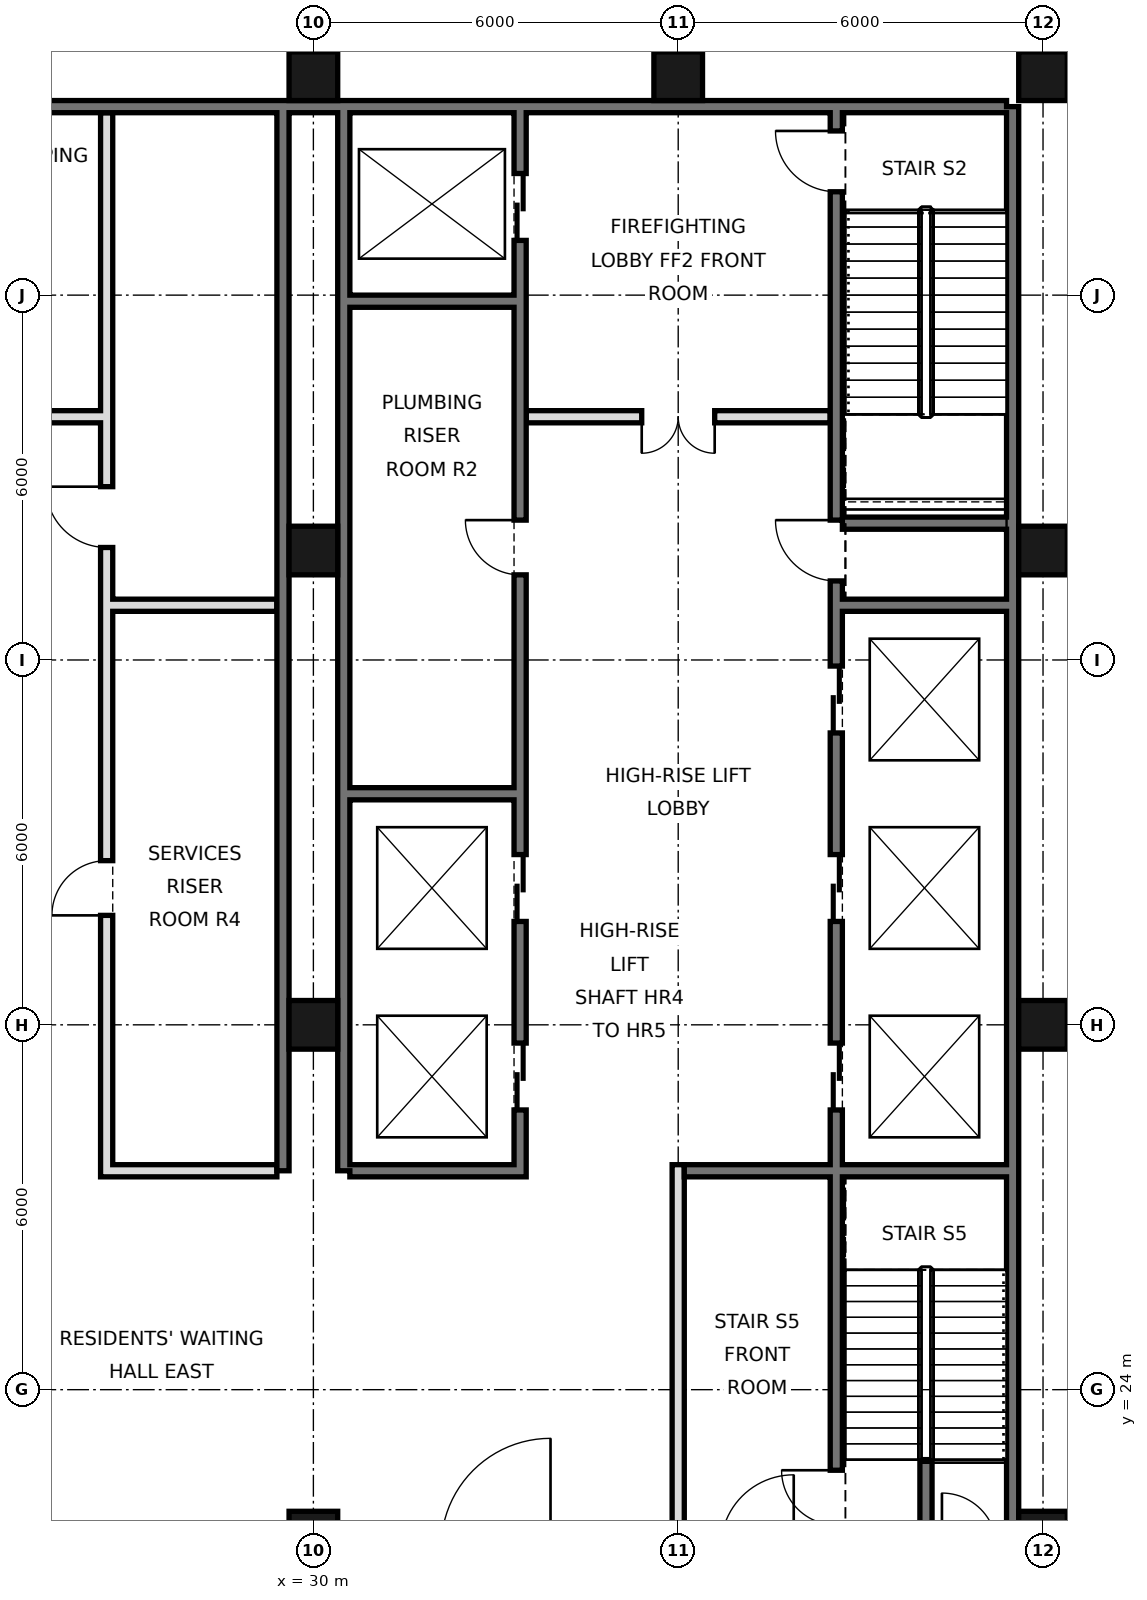
"""IFC4 building model, lengths in metres.
Left out: names, types, materials, properties, quantities, classifications, styles, units other than length and angle.
Written with IfcOpenShell. Run it as: python <this file> out.ifc"""

import sys

from ifc_helpers import new_model, si_unit, direction, frame, frame_2d, origin, origin_2d, place, context, subcontext, project, spatial, rectangle, hollow_rectangle, extrude, element, fill, save


model = new_model("IFC4")
c1 = context("Model", 3, precision=1e-05, world=origin(), true_north=direction((0.0, 1.0)))
c2 = subcontext(c1, "Body", "Model", "MODEL_VIEW")
j1 = project(units=[si_unit("LENGTHUNIT", "METRE"), si_unit("PLANEANGLEUNIT", "RADIAN")], contexts=[c1])
p1 = place(None, origin())
s1 = spatial("IfcSite", under=j1, at=p1, CompositionType="ELEMENT")
p2 = place(p1, origin())
s2 = spatial("IfcBuilding", under=s1, at=p2, CompositionType="ELEMENT")
p3 = place(p2, frame((0.0, 0.0, 281.8)))
s3 = spatial("IfcBuildingStorey", under=s2, at=p3, CompositionType="ELEMENT", Elevation=281.8)
for number, where, z_axis, x_axis in (
    (1, (30.0, 21.6, 0.0), (0.0, 0.0, 1.0), (1.0, 0.0, 0.0)),
    (2, (30.0, 30.0, 0.0), (0.0, 0.0, 1.0), (1.0, 0.0, 0.0)),
    (3, (30.0, 37.8, 0.0), (0.0, 0.0, 1.0), (1.0, 0.0, 0.0)),
    (4, (30.0, 45.6, 0.0), (0.0, 0.0, 1.0), (1.0, 0.0, 0.0)),
    (5, (36.0, 45.6, 0.0), (0.0, 0.0, 1.0), (1.0, 0.0, 0.0)),
    (6, (42.0, 21.6, 0.0), (0.0, 0.0, 1.0), (1.0, 0.0, 0.0)),
    (7, (42.0, 30.0, 0.0), (0.0, 0.0, 1.0), (1.0, 0.0, 0.0)),
    (8, (42.0, 37.8, 0.0), (0.0, 0.0, 1.0), (1.0, 0.0, 0.0)),
    (9, (42.0, 45.6, 0.0), (0.0, 0.0, 1.0), (1.0, 0.0, 0.0)),
):
    element("IfcColumn", number, at=place(p3, frame(where, z_axis=z_axis, x_axis=x_axis)), inside=s3, PredefinedType="COLUMN", context=c2, shape_type="SweptSolid", body=[
        extrude(hollow_rectangle(XDim=0.8, YDim=0.8, WallThickness=0.032, at=origin_2d()), origin(), (0.0, 0.0, 1.0), 9.0),
    ])
p4 = place(p3, frame((41.5, 21.6, 0.0), z_axis=(0.0, 0.0, 1.0), x_axis=(0.0, 1.0, 0.0)))
e10 = element("IfcWall", 10, at=p4, inside=s3, PredefinedType="SOLIDWALL", context=c2, shape_type="SweptSolid", body=[
    extrude(rectangle(XDim=23.5, YDim=0.2, at=frame_2d((11.75, 0.0))), origin(), (0.0, 0.0, 1.0), 8.7),
])
p5 = place(p3, frame((6.6, 45.1, 0.0), z_axis=(0.0, 0.0, 1.0), x_axis=(1.0, 0.0, 0.0)))
e11 = element("IfcWall", 11, at=p5, inside=s3, PredefinedType="SOLIDWALL", context=c2, shape_type="SweptSolid", body=[
    extrude(rectangle(XDim=34.8, YDim=0.2, at=frame_2d((17.4, 0.0))), origin(), (0.0, 0.0, 1.0), 8.7),
])
for number, where, z_axis, x_axis in (
    (12, (29.5, 27.6, 0.0), (0.0, 0.0, 1.0), (0.0, 1.0, 0.0)),
    (13, (30.5, 27.6, 0.0), (0.0, 0.0, 1.0), (0.0, 1.0, 0.0)),
):
    element("IfcWall", number, at=place(p3, frame(where, z_axis=z_axis, x_axis=x_axis)), inside=s3, PredefinedType="SOLIDWALL", context=c2, shape_type="SweptSolid", body=[
        extrude(rectangle(XDim=17.5, YDim=0.2, at=frame_2d((8.75, 0.0))), origin(), (0.0, 0.0, 1.0), 8.7),
    ])
p6 = place(p3, frame((26.6, 27.5, 0.0), z_axis=(0.0, 0.0, 1.0), x_axis=(0.0, 1.0, 0.0)))
e14 = element("IfcWall", 14, at=p6, inside=s3, PredefinedType="SOLIDWALL", context=c2, shape_type="SweptSolid", body=[
    extrude(rectangle(XDim=17.5, YDim=0.2, at=frame_2d((8.75, 0.0))), origin(), (0.0, 0.0, 1.0), 8.7),
])
p7 = place(p6, frame((4.3, 0.0, 0.0)))
e15 = element("IfcOpeningElement", 15, at=p7, cuts=e14, PredefinedType="OPENING", context=c2, shape_type="SweptSolid", body=[
    extrude(rectangle(XDim=0.9, YDim=2.1, at=frame_2d((0.45, 1.05))), frame((0.0, 0.11, 0.0), z_axis=(0.0, -1.0, 0.0), x_axis=(1.0, 0.0, 0.0)), (0.0, 0.0, 1.0), 0.22),
])
p8 = place(p6, frame((10.35, 0.0, 0.0)))
e16 = element("IfcOpeningElement", 16, at=p8, cuts=e14, PredefinedType="OPENING", context=c2, shape_type="SweptSolid", body=[
    extrude(rectangle(XDim=1.0, YDim=2.1, at=frame_2d((0.5, 1.05))), frame((0.0, 0.11, 0.0), z_axis=(0.0, -1.0, 0.0), x_axis=(1.0, 0.0, 0.0)), (0.0, 0.0, 1.0), 0.22),
])
p9 = place(p3, frame((33.4, 27.5, 0.0), z_axis=(0.0, 0.0, 1.0), x_axis=(0.0, 1.0, 0.0)))
e17 = element("IfcWall", 17, at=p9, inside=s3, PredefinedType="SOLIDWALL", context=c2, shape_type="SweptSolid", body=[
    extrude(rectangle(XDim=17.5, YDim=0.2, at=frame_2d((8.75, 0.0))), origin(), (0.0, 0.0, 1.0), 8.7),
])
p10 = place(p9, frame((1.1, 0.0, 0.0)))
e18 = element("IfcOpeningElement", 18, at=p10, cuts=e17, PredefinedType="OPENING", context=c2, shape_type="SweptSolid", body=[
    extrude(rectangle(XDim=1.1, YDim=2.1, at=frame_2d((0.55, 1.05))), frame((0.0, 0.11, 0.0), z_axis=(0.0, -1.0, 0.0), x_axis=(1.0, 0.0, 0.0)), (0.0, 0.0, 1.0), 0.22),
])
p11 = place(p9, frame((4.2, 0.0, 0.0)))
e19 = element("IfcOpeningElement", 19, at=p11, cuts=e17, PredefinedType="OPENING", context=c2, shape_type="SweptSolid", body=[
    extrude(rectangle(XDim=1.1, YDim=2.1, at=frame_2d((0.55, 1.05))), frame((0.0, 0.11, 0.0), z_axis=(0.0, -1.0, 0.0), x_axis=(1.0, 0.0, 0.0)), (0.0, 0.0, 1.0), 0.22),
])
p12 = place(p9, frame((15.4, 0.0, 0.0)))
e20 = element("IfcOpeningElement", 20, at=p12, cuts=e17, PredefinedType="OPENING", context=c2, shape_type="SweptSolid", body=[
    extrude(rectangle(XDim=1.1, YDim=2.1, at=frame_2d((0.55, 1.05))), frame((0.0, 0.11, 0.0), z_axis=(0.0, -1.0, 0.0), x_axis=(1.0, 0.0, 0.0)), (0.0, 0.0, 1.0), 0.22),
])
p13 = place(p9, frame((9.9, 0.0, 0.0)))
e21 = element("IfcOpeningElement", 21, at=p13, cuts=e17, PredefinedType="OPENING", context=c2, shape_type="SweptSolid", body=[
    extrude(rectangle(XDim=0.9, YDim=2.1, at=frame_2d((0.45, 1.05))), frame((0.0, 0.11, 0.0), z_axis=(0.0, -1.0, 0.0), x_axis=(1.0, 0.0, 0.0)), (0.0, 0.0, 1.0), 0.22),
])
p14 = place(p3, frame((36.0, 21.6, 0.0), z_axis=(0.0, 0.0, 1.0), x_axis=(0.0, 1.0, 0.0)))
e22 = element("IfcWall", 22, at=p14, inside=s3, PredefinedType="PARTITIONING", context=c2, shape_type="SweptSolid", body=[
    extrude(rectangle(XDim=6.1, YDim=0.2, at=frame_2d((3.05, 0.0))), origin(), (0.0, 0.0, 1.0), 8.7),
])
p15 = place(p3, frame((38.6, 21.6, 0.0), z_axis=(0.0, 0.0, 1.0), x_axis=(0.0, 1.0, 0.0)))
e23 = element("IfcWall", 23, at=p15, inside=s3, PredefinedType="SOLIDWALL", context=c2, shape_type="SweptSolid", body=[
    extrude(rectangle(XDim=23.4, YDim=0.2, at=frame_2d((11.7, 0.0))), origin(), (0.0, 0.0, 1.0), 8.7),
])
p16 = place(p15, frame((7.0, 0.0, 0.0)))
e24 = element("IfcOpeningElement", 24, at=p16, cuts=e23, PredefinedType="OPENING", context=c2, shape_type="SweptSolid", body=[
    extrude(rectangle(XDim=1.1, YDim=2.1, at=frame_2d((0.55, 1.05))), frame((0.0, 0.11, 0.0), z_axis=(0.0, -1.0, 0.0), x_axis=(1.0, 0.0, 0.0)), (0.0, 0.0, 1.0), 0.22),
])
p17 = place(p15, frame((10.1, 0.0, 0.0)))
e25 = element("IfcOpeningElement", 25, at=p17, cuts=e23, PredefinedType="OPENING", context=c2, shape_type="SweptSolid", body=[
    extrude(rectangle(XDim=1.1, YDim=2.1, at=frame_2d((0.55, 1.05))), frame((0.0, 0.11, 0.0), z_axis=(0.0, -1.0, 0.0), x_axis=(1.0, 0.0, 0.0)), (0.0, 0.0, 1.0), 0.22),
])
p18 = place(p15, frame((13.2, 0.0, 0.0)))
e26 = element("IfcOpeningElement", 26, at=p18, cuts=e23, PredefinedType="OPENING", context=c2, shape_type="SweptSolid", body=[
    extrude(rectangle(XDim=1.1, YDim=2.1, at=frame_2d((0.55, 1.05))), frame((0.0, 0.11, 0.0), z_axis=(0.0, -1.0, 0.0), x_axis=(1.0, 0.0, 0.0)), (0.0, 0.0, 1.0), 0.22),
])
p19 = place(p15, frame((15.7, 0.0, 0.0)))
e27 = element("IfcOpeningElement", 27, at=p19, cuts=e23, PredefinedType="OPENING", context=c2, shape_type="SweptSolid", body=[
    extrude(rectangle(XDim=1.0, YDim=2.1, at=frame_2d((0.5, 1.05))), frame((0.0, 0.11, 0.0), z_axis=(0.0, -1.0, 0.0), x_axis=(1.0, 0.0, 0.0)), (0.0, 0.0, 1.0), 0.22),
])
p20 = place(p15, frame((22.1, 0.0, 0.0)))
e28 = element("IfcOpeningElement", 28, at=p20, cuts=e23, PredefinedType="OPENING", context=c2, shape_type="SweptSolid", body=[
    extrude(rectangle(XDim=1.0, YDim=2.1, at=frame_2d((0.5, 1.05))), frame((0.0, 0.11, 0.0), z_axis=(0.0, -1.0, 0.0), x_axis=(1.0, 0.0, 0.0)), (0.0, 0.0, 1.0), 0.22),
])
p21 = place(p15, frame((0.175, 0.0, 0.0)))
e29 = element("IfcOpeningElement", 29, at=p21, cuts=e23, PredefinedType="OPENING", context=c2, shape_type="SweptSolid", body=[
    extrude(rectangle(XDim=0.9, YDim=2.1, at=frame_2d((0.45, 1.05))), frame((0.0, 0.11, 0.0), z_axis=(0.0, -1.0, 0.0), x_axis=(1.0, 0.0, 0.0)), (0.0, 0.0, 1.0), 0.22),
])
p22 = place(p3, frame((40.075, 21.6, 0.0), z_axis=(0.0, 0.0, 1.0), x_axis=(0.0, 1.0, 0.0)))
e30 = element("IfcWall", 30, at=p22, inside=s3, PredefinedType="SOLIDWALL", context=c2, shape_type="SweptSolid", body=[
    extrude(rectangle(XDim=1.25, YDim=0.2, at=frame_2d((0.625, 0.0))), origin(), (0.0, 0.0, 1.0), 8.7),
])
for number, where, z_axis, x_axis in (
    (31, (26.7, 27.6, 0.0), (0.0, 0.0, 1.0), (1.0, 0.0, 0.0)),
    (32, (30.6, 27.6, 0.0), (0.0, 0.0, 1.0), (1.0, 0.0, 0.0)),
):
    element("IfcWall", number, at=place(p3, frame(where, z_axis=z_axis, x_axis=x_axis)), inside=s3, PredefinedType="SOLIDWALL", context=c2, shape_type="SweptSolid", body=[
        extrude(rectangle(XDim=2.7, YDim=0.2, at=frame_2d((1.35, 0.0))), origin(), (0.0, 0.0, 1.0), 8.7),
    ])
p23 = place(p3, frame((36.1, 27.6, 0.0), z_axis=(0.0, 0.0, 1.0), x_axis=(1.0, 0.0, 0.0)))
e33 = element("IfcWall", 33, at=p23, inside=s3, PredefinedType="SOLIDWALL", context=c2, shape_type="SweptSolid", body=[
    extrude(rectangle(XDim=5.3, YDim=0.2, at=frame_2d((2.65, 0.0))), origin(), (0.0, 0.0, 1.0), 8.7),
])
for number, where, z_axis, x_axis in (
    (34, (30.6, 33.8, 0.0), (0.0, 0.0, 1.0), (1.0, 0.0, 0.0)),
    (35, (26.7, 36.9, 0.0), (0.0, 0.0, 1.0), (1.0, 0.0, 0.0)),
    (36, (38.7, 36.9, 0.0), (0.0, 0.0, 1.0), (1.0, 0.0, 0.0)),
):
    element("IfcWall", number, at=place(p3, frame(where, z_axis=z_axis, x_axis=x_axis)), inside=s3, PredefinedType="SOLIDWALL", context=c2, shape_type="SweptSolid", body=[
        extrude(rectangle(XDim=2.7, YDim=0.2, at=frame_2d((1.35, 0.0))), origin(), (0.0, 0.0, 1.0), 8.7),
    ])
p24 = place(p3, frame((38.7, 38.25, 0.0), z_axis=(0.0, 0.0, 1.0), x_axis=(1.0, 0.0, 0.0)))
e37 = element("IfcWall", 37, at=p24, inside=s3, PredefinedType="SOLIDWALL", context=c2, shape_type="SweptSolid", body=[
    extrude(rectangle(XDim=2.7, YDim=0.2, at=frame_2d((1.35, 0.0))), origin(), (0.0, 0.0, 1.0), 4.3),
])
p25 = place(p3, frame((21.5, 40.0, 0.0), z_axis=(0.0, 0.0, 1.0), x_axis=(1.0, 0.0, 0.0)))
e38 = element("IfcWall", 38, at=p25, inside=s3, PredefinedType="PARTITIONING", context=c2, shape_type="SweptSolid", body=[
    extrude(rectangle(XDim=5.0, YDim=0.2, at=frame_2d((2.5, 0.0))), origin(), (0.0, 0.0, 1.0), 8.7),
])
p26 = place(p25, frame((1.9, 0.0, 0.0)))
e39 = element("IfcOpeningElement", 39, at=p26, cuts=e38, PredefinedType="OPENING", context=c2, shape_type="SweptSolid", body=[
    extrude(rectangle(XDim=1.2, YDim=2.1, at=frame_2d((0.6, 1.05))), frame((0.0, 0.11, 0.0), z_axis=(0.0, -1.0, 0.0), x_axis=(1.0, 0.0, 0.0)), (0.0, 0.0, 1.0), 0.22),
])
p27 = place(p3, frame((33.5, 40.0, 0.0), z_axis=(0.0, 0.0, 1.0), x_axis=(1.0, 0.0, 0.0)))
e40 = element("IfcWall", 40, at=p27, inside=s3, PredefinedType="PARTITIONING", context=c2, shape_type="SweptSolid", body=[
    extrude(rectangle(XDim=5.0, YDim=0.2, at=frame_2d((2.5, 0.0))), origin(), (0.0, 0.0, 1.0), 8.7),
])
p28 = place(p27, frame((1.9, 0.0, 0.0)))
e41 = element("IfcOpeningElement", 41, at=p28, cuts=e40, PredefinedType="OPENING", context=c2, shape_type="SweptSolid", body=[
    extrude(rectangle(XDim=1.2, YDim=2.1, at=frame_2d((0.6, 1.05))), frame((0.0, 0.11, 0.0), z_axis=(0.0, -1.0, 0.0), x_axis=(1.0, 0.0, 0.0)), (0.0, 0.0, 1.0), 0.22),
])
p29 = place(p3, frame((30.6, 41.9, 0.0), z_axis=(0.0, 0.0, 1.0), x_axis=(1.0, 0.0, 0.0)))
e42 = element("IfcWall", 42, at=p29, inside=s3, PredefinedType="SOLIDWALL", context=c2, shape_type="SweptSolid", body=[
    extrude(rectangle(XDim=2.7, YDim=0.2, at=frame_2d((1.35, 0.0))), origin(), (0.0, 0.0, 1.0), 8.7),
])
p30 = place(p28, frame((1.2, 0.0, 0.0), z_axis=(0.0, 0.0, 1.0), x_axis=(-1.0, 0.0, 0.0)))
e43 = element("IfcDoor", 43, at=p30, inside=s3, OperationType="DOUBLE_DOOR_SINGLE_SWING", PredefinedType="DOOR", context=c2, shape_type="SweptSolid", body=[
    extrude(rectangle(XDim=1.2, YDim=2.1, at=frame_2d((0.6, 1.05))), frame((0.0, 0.025, 0.0), z_axis=(0.0, -1.0, 0.0), x_axis=(1.0, 0.0, 0.0)), (0.0, 0.0, 1.0), 0.05),
])
fill(e41, e43)
p31 = place(p16, origin())
e44 = element("IfcDoor", 44, at=p31, inside=s3, OperationType="DOUBLE_DOOR_SLIDING", PredefinedType="DOOR", context=c2, shape_type="SweptSolid", body=[
    extrude(rectangle(XDim=1.1, YDim=2.1, at=frame_2d((0.55, 1.05))), frame((0.0, 0.025, 0.0), z_axis=(0.0, -1.0, 0.0), x_axis=(1.0, 0.0, 0.0)), (0.0, 0.0, 1.0), 0.05),
])
fill(e24, e44)
p32 = place(p17, origin())
e45 = element("IfcDoor", 45, at=p32, inside=s3, OperationType="DOUBLE_DOOR_SLIDING", PredefinedType="DOOR", context=c2, shape_type="SweptSolid", body=[
    extrude(rectangle(XDim=1.1, YDim=2.1, at=frame_2d((0.55, 1.05))), frame((0.0, 0.025, 0.0), z_axis=(0.0, -1.0, 0.0), x_axis=(1.0, 0.0, 0.0)), (0.0, 0.0, 1.0), 0.05),
])
fill(e25, e45)
p33 = place(p18, origin())
e46 = element("IfcDoor", 46, at=p33, inside=s3, OperationType="DOUBLE_DOOR_SLIDING", PredefinedType="DOOR", context=c2, shape_type="SweptSolid", body=[
    extrude(rectangle(XDim=1.1, YDim=2.1, at=frame_2d((0.55, 1.05))), frame((0.0, 0.025, 0.0), z_axis=(0.0, -1.0, 0.0), x_axis=(1.0, 0.0, 0.0)), (0.0, 0.0, 1.0), 0.05),
])
fill(e26, e46)
p34 = place(p10, origin())
e47 = element("IfcDoor", 47, at=p34, inside=s3, OperationType="DOUBLE_DOOR_SLIDING", PredefinedType="DOOR", context=c2, shape_type="SweptSolid", body=[
    extrude(rectangle(XDim=1.1, YDim=2.1, at=frame_2d((0.55, 1.05))), frame((0.0, 0.025, 0.0), z_axis=(0.0, -1.0, 0.0), x_axis=(1.0, 0.0, 0.0)), (0.0, 0.0, 1.0), 0.05),
])
fill(e18, e47)
p35 = place(p11, origin())
e48 = element("IfcDoor", 48, at=p35, inside=s3, OperationType="DOUBLE_DOOR_SLIDING", PredefinedType="DOOR", context=c2, shape_type="SweptSolid", body=[
    extrude(rectangle(XDim=1.1, YDim=2.1, at=frame_2d((0.55, 1.05))), frame((0.0, 0.025, 0.0), z_axis=(0.0, -1.0, 0.0), x_axis=(1.0, 0.0, 0.0)), (0.0, 0.0, 1.0), 0.05),
])
fill(e19, e48)
p36 = place(p12, origin())
e49 = element("IfcDoor", 49, at=p36, inside=s3, OperationType="DOUBLE_DOOR_SLIDING", PredefinedType="DOOR", context=c2, shape_type="SweptSolid", body=[
    extrude(rectangle(XDim=1.1, YDim=2.1, at=frame_2d((0.55, 1.05))), frame((0.0, 0.025, 0.0), z_axis=(0.0, -1.0, 0.0), x_axis=(1.0, 0.0, 0.0)), (0.0, 0.0, 1.0), 0.05),
])
fill(e20, e49)
p37 = place(p19, frame((1.0, 0.0, 0.0), z_axis=(0.0, 0.0, 1.0), x_axis=(-1.0, 0.0, 0.0)))
e50 = element("IfcDoor", 50, at=p37, inside=s3, OperationType="SINGLE_SWING_LEFT", PredefinedType="DOOR", context=c2, shape_type="SweptSolid", body=[
    extrude(rectangle(XDim=1.0, YDim=2.1, at=frame_2d((0.5, 1.05))), frame((0.0, 0.025, 0.0), z_axis=(0.0, -1.0, 0.0), x_axis=(1.0, 0.0, 0.0)), (0.0, 0.0, 1.0), 0.05),
])
fill(e27, e50)
p38 = place(p20, frame((1.0, 0.0, 0.0), z_axis=(0.0, 0.0, 1.0), x_axis=(-1.0, 0.0, 0.0)))
e51 = element("IfcDoor", 51, at=p38, inside=s3, OperationType="SINGLE_SWING_LEFT", PredefinedType="DOOR", context=c2, shape_type="SweptSolid", body=[
    extrude(rectangle(XDim=1.0, YDim=2.1, at=frame_2d((0.5, 1.05))), frame((0.0, 0.025, 0.0), z_axis=(0.0, -1.0, 0.0), x_axis=(1.0, 0.0, 0.0)), (0.0, 0.0, 1.0), 0.05),
])
fill(e28, e51)
p39 = place(p21, frame((0.9, 0.0, 0.0), z_axis=(0.0, 0.0, 1.0), x_axis=(-1.0, 0.0, 0.0)))
e52 = element("IfcDoor", 52, at=p39, inside=s3, OperationType="SINGLE_SWING_LEFT", PredefinedType="DOOR", context=c2, shape_type="SweptSolid", body=[
    extrude(rectangle(XDim=0.9, YDim=2.1, at=frame_2d((0.45, 1.05))), frame((0.0, 0.025, 0.0), z_axis=(0.0, -1.0, 0.0), x_axis=(1.0, 0.0, 0.0)), (0.0, 0.0, 1.0), 0.05),
])
fill(e29, e52)
p40 = place(p13, frame((0.9, 0.0, 0.0), z_axis=(0.0, 0.0, 1.0), x_axis=(-1.0, 0.0, 0.0)))
e53 = element("IfcDoor", 53, at=p40, inside=s3, OperationType="SINGLE_SWING_LEFT", PredefinedType="DOOR", context=c2, shape_type="SweptSolid", body=[
    extrude(rectangle(XDim=0.9, YDim=2.1, at=frame_2d((0.45, 1.05))), frame((0.0, 0.025, 0.0), z_axis=(0.0, -1.0, 0.0), x_axis=(1.0, 0.0, 0.0)), (0.0, 0.0, 1.0), 0.05),
])
fill(e21, e53)
p41 = place(p7, origin())
e54 = element("IfcDoor", 54, at=p41, inside=s3, OperationType="SINGLE_SWING_LEFT", PredefinedType="DOOR", context=c2, shape_type="SweptSolid", body=[
    extrude(rectangle(XDim=0.9, YDim=2.1, at=frame_2d((0.45, 1.05))), frame((0.0, 0.025, 0.0), z_axis=(0.0, -1.0, 0.0), x_axis=(1.0, 0.0, 0.0)), (0.0, 0.0, 1.0), 0.05),
])
fill(e15, e54)
p42 = place(p8, frame((1.0, 0.0, 0.0), z_axis=(0.0, 0.0, 1.0), x_axis=(-1.0, 0.0, 0.0)))
e55 = element("IfcDoor", 55, at=p42, inside=s3, OperationType="SINGLE_SWING_LEFT", PredefinedType="DOOR", context=c2, shape_type="SweptSolid", body=[
    extrude(rectangle(XDim=1.0, YDim=2.1, at=frame_2d((0.5, 1.05))), frame((0.0, 0.025, 0.0), z_axis=(0.0, -1.0, 0.0), x_axis=(1.0, 0.0, 0.0)), (0.0, 0.0, 1.0), 0.05),
])
fill(e16, e55)
save(model, sys.argv[1])
